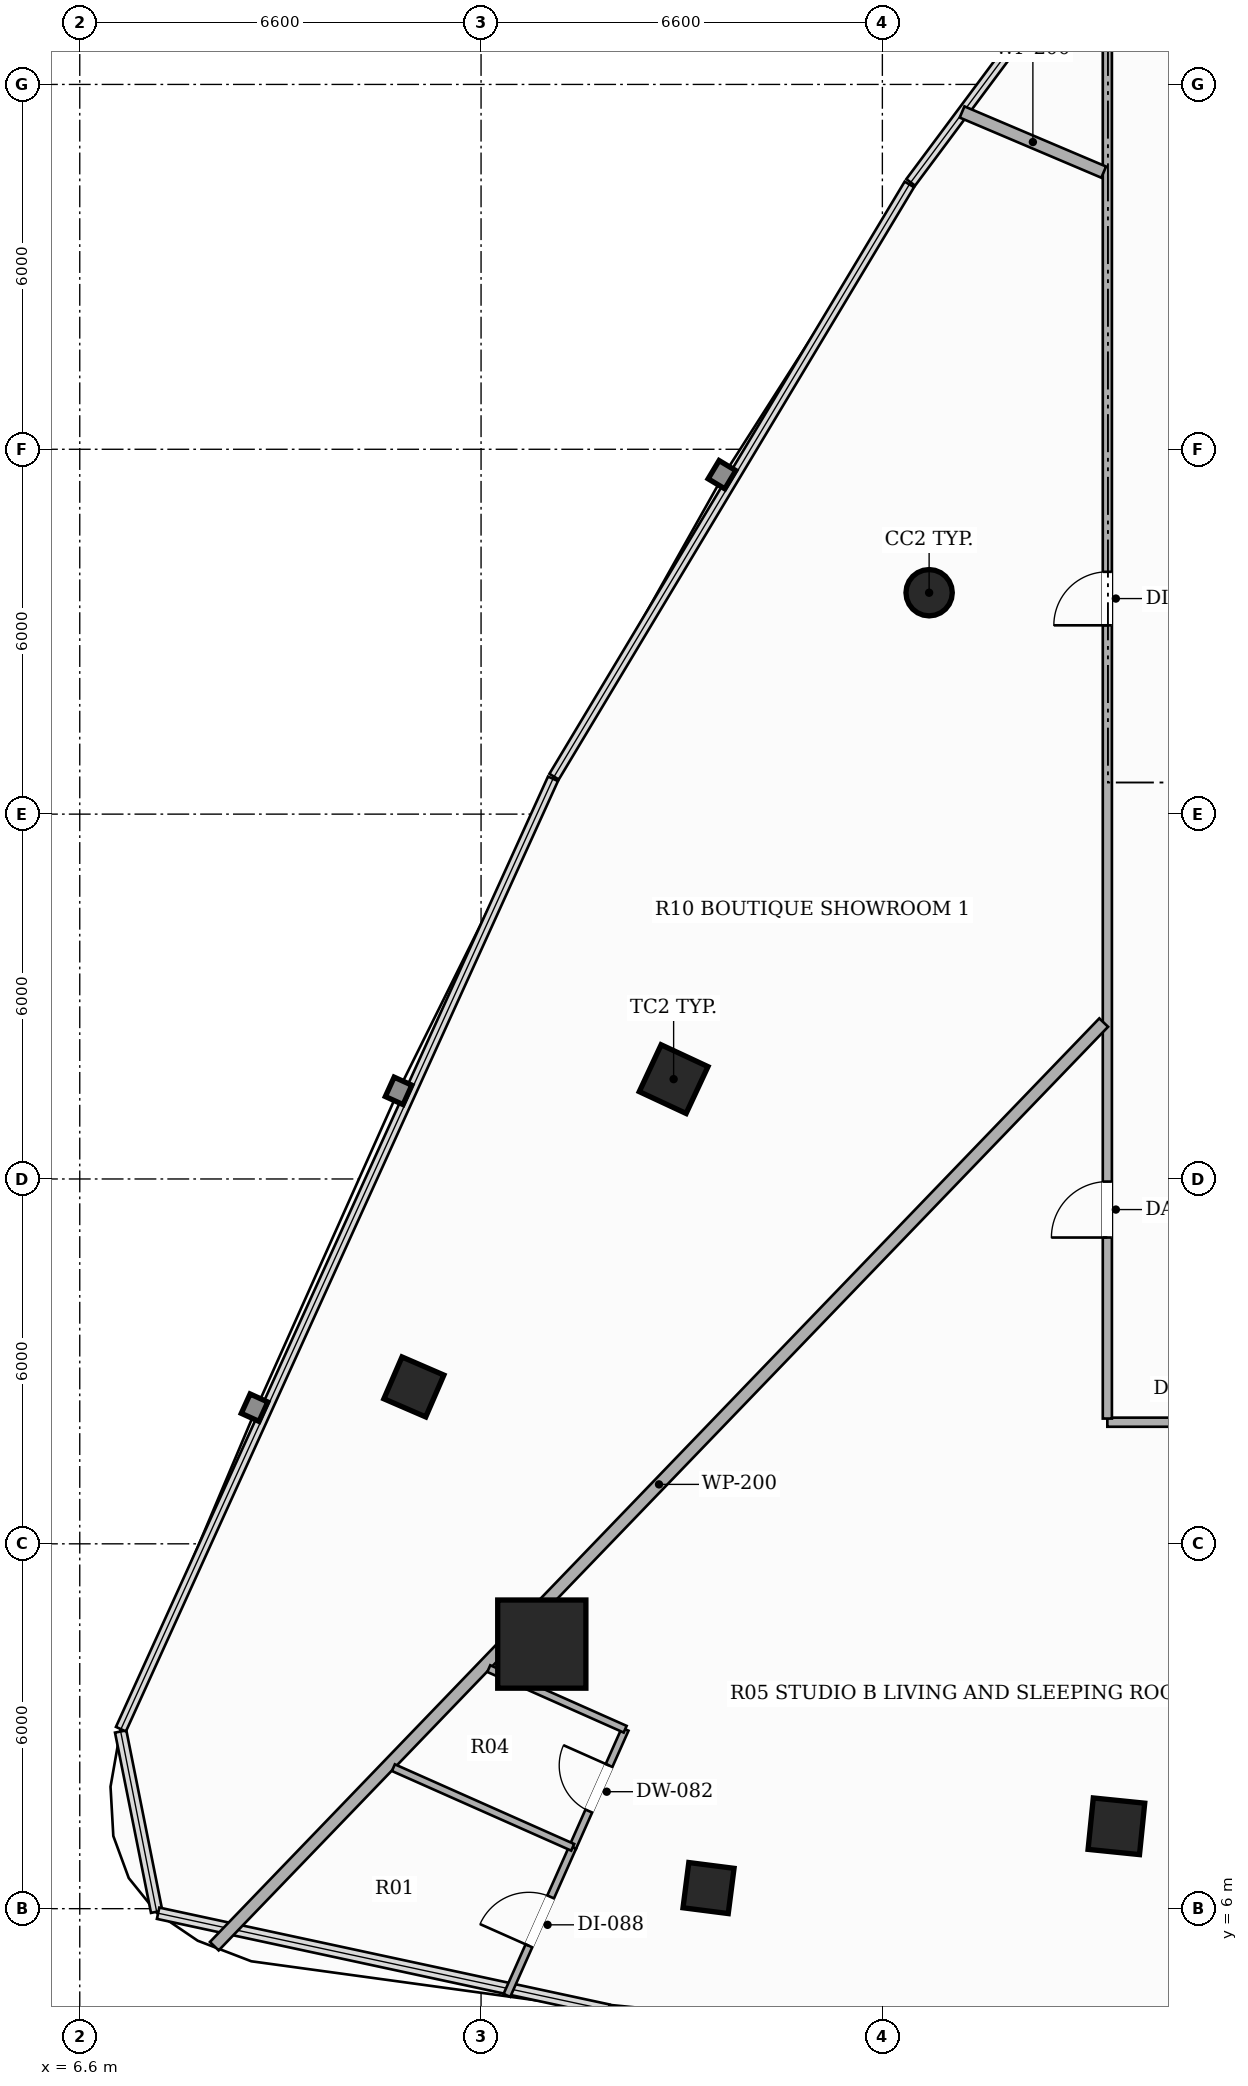
"""IFC4 building model, lengths in metres.
Left out: names, types, materials, properties, quantities, classifications, styles, units other than length and angle.
Written with IfcOpenShell. Run it as: python <this file> out.ifc"""

import sys

from ifc_helpers import new_model, si_unit, direction, frame, frame_2d, origin, origin_2d, place, context, subcontext, project, spatial, rectangle, hollow_rectangle, hollow_circle, extrude, element, fill, save


model = new_model("IFC4")
c1 = context("Model", 3, precision=1e-05, world=origin(), true_north=direction((0.0, 1.0)))
c2 = subcontext(c1, "Body", "Model", "MODEL_VIEW")
j1 = project(units=[si_unit("LENGTHUNIT", "METRE"), si_unit("PLANEANGLEUNIT", "RADIAN")], contexts=[c1])
p1 = place(None, origin())
s1 = spatial("IfcSite", under=j1, at=p1, CompositionType="ELEMENT")
p2 = place(p1, origin())
s2 = spatial("IfcBuilding", under=s1, at=p2, CompositionType="ELEMENT")
p3 = place(p2, frame((0.0, 0.0, 126.5)))
s3 = spatial("IfcBuildingStorey", under=s2, at=p3, CompositionType="ELEMENT", Elevation=126.5)
p4 = place(p3, frame((14.199, 10.351, 0.0), z_axis=(0.0, 0.0, 1.0), x_axis=(1.0, 0.0, 0.0)))
e1 = element("IfcColumn", 1, at=p4, inside=s3, PredefinedType="COLUMN", context=c2, shape_type="SweptSolid", body=[
    extrude(hollow_rectangle(XDim=1.45, YDim=1.45, WallThickness=0.045, at=origin_2d()), origin(), (0.0, 0.0, 1.0), 3.3),
])
p5 = place(p3, frame((20.569, 27.641, 0.0), z_axis=(0.0, 0.0, 1.0), x_axis=(1.0, 0.0, 0.0)))
e2 = element("IfcColumn", 2, at=p5, inside=s3, PredefinedType="COLUMN", context=c2, shape_type="SweptSolid", body=[
    extrude(hollow_circle(Radius=0.381, WallThickness=0.022, at=origin_2d()), origin(), (0.0, 0.0, 1.0), 3.3),
])
for number, where, z_axis, x_axis in (
    (3, (16.367, 19.642, 0.0), (0.0, 0.0, 1.0), (0.423, 0.906, 0.0)),
    (4, (23.649, 7.355, 0.0), (0.0, 0.0, 1.0), (-0.995, 0.101, 0.0)),
):
    element("IfcColumn", number, at=place(p3, frame(where, z_axis=z_axis, x_axis=x_axis)), inside=s3, PredefinedType="COLUMN", context=c2, shape_type="SweptSolid", body=[
        extrude(hollow_rectangle(XDim=0.85, YDim=0.85, WallThickness=0.028, at=origin_2d()), origin(), (0.0, 0.0, 1.0), 3.3),
    ])
for number, where, z_axis, x_axis in (
    (5, (12.095, 14.58, 0.0), (0.0, 0.0, 1.0), (0.397, 0.918, 0.0)),
    (6, (16.941, 6.339, 0.0), (0.0, 0.0, 1.0), (-0.992, 0.127, 0.0)),
):
    element("IfcColumn", number, at=place(p3, frame(where, z_axis=z_axis, x_axis=x_axis)), inside=s3, PredefinedType="COLUMN", context=c2, shape_type="SweptSolid", body=[
        extrude(hollow_rectangle(XDim=0.75, YDim=0.75, WallThickness=0.025, at=origin_2d()), origin(), (0.0, 0.0, 1.0), 3.3),
    ])
p6 = place(p3, frame((26.09, 14.0, 0.0), z_axis=(0.0, 0.0, 1.0), x_axis=(-1.0, 0.0, 0.0)))
e7 = element("IfcWall", 7, at=p6, inside=s3, PredefinedType="PARTITIONING", context=c2, shape_type="SweptSolid", body=[
    extrude(rectangle(XDim=2.59, YDim=0.15, at=frame_2d((1.295, 0.0))), origin(), (0.0, 0.0, 1.0), 2.721),
])
p7 = place(p3, frame((23.5, 14.06, 0.0), z_axis=(0.0, 0.0, 1.0), x_axis=(0.0, 1.0, 0.0)))
e8 = element("IfcWall", 8, at=p7, inside=s3, PredefinedType="PARTITIONING", context=c2, shape_type="SweptSolid", body=[
    extrude(rectangle(XDim=22.84, YDim=0.15, at=frame_2d((11.42, 0.0))), origin(), (0.0, 0.0, 1.0), 2.413),
])
p8 = place(p7, frame((13.045, 0.0, 0.0)))
e9 = element("IfcOpeningElement", 9, at=p8, cuts=e8, PredefinedType="OPENING", context=c2, shape_type="SweptSolid", body=[
    extrude(rectangle(XDim=0.88, YDim=2.1, at=frame_2d((0.44, 1.05))), frame((0.0, 0.085, 0.0), z_axis=(0.0, -1.0, 0.0), x_axis=(1.0, 0.0, 0.0)), (0.0, 0.0, 1.0), 0.17),
])
p9 = place(p7, frame((2.977, 0.0, 0.0)))
e10 = element("IfcOpeningElement", 10, at=p9, cuts=e8, PredefinedType="OPENING", context=c2, shape_type="SweptSolid", body=[
    extrude(rectangle(XDim=0.92, YDim=2.15, at=frame_2d((0.46, 1.075))), frame((0.0, 0.085, 0.0), z_axis=(0.0, -1.0, 0.0), x_axis=(1.0, 0.0, 0.0)), (0.0, 0.0, 1.0), 0.17),
])
p10 = place(p3, frame((23.44, 20.572, 0.0), z_axis=(0.0, 0.0, 1.0), x_axis=(-0.693655036552, -0.720307358193, 0.0)))
e11 = element("IfcWall", 11, at=p10, inside=s3, PredefinedType="PARTITIONING", context=c2, shape_type="SweptSolid", body=[
    extrude(rectangle(XDim=21.087, YDim=0.2, at=frame_2d((10.543, 0.0))), origin(), (0.0, 0.0, 1.0), 2.413),
])
p11 = place(p3, frame((21.111, 35.547, 0.0), z_axis=(0.0, 0.0, 1.0), x_axis=(0.920437694564, -0.390889307126, 0.0)))
e12 = element("IfcWall", 12, at=p11, inside=s3, PredefinedType="PARTITIONING", context=c2, shape_type="SweptSolid", body=[
    extrude(rectangle(XDim=2.53, YDim=0.2, at=frame_2d((1.265, 0.0))), origin(), (0.0, 0.0, 1.0), 3.06),
])
p12 = place(p3, frame((14.707, 7.009, 0.0), z_axis=(0.0, 0.0, 1.0), x_axis=(0.406127806348, 0.913816286193, 0.0)))
e13 = element("IfcWall", 13, at=p12, inside=s3, PredefinedType="PARTITIONING", context=c2, shape_type="SweptSolid", body=[
    extrude(rectangle(XDim=2.125, YDim=0.12, at=frame_2d((1.062, 0.0))), origin(), (0.0, 0.0, 1.0), 2.413),
])
p13 = place(p12, frame((0.653, 0.0, 0.0)))
e14 = element("IfcOpeningElement", 14, at=p13, cuts=e13, PredefinedType="OPENING", context=c2, shape_type="SweptSolid", body=[
    extrude(rectangle(XDim=0.82, YDim=2.1, at=frame_2d((0.41, 1.05))), frame((0.0, 0.07, 0.0), z_axis=(0.0, -1.0, 0.0), x_axis=(1.0, 0.0, 0.0)), (0.0, 0.0, 1.0), 0.14),
])
p14 = place(p3, frame((15.57, 8.951, 0.0), z_axis=(0.0, 0.0, 1.0), x_axis=(-0.91379514288, 0.406175376961, 0.0)))
e15 = element("IfcWall", 15, at=p14, inside=s3, PredefinedType="PARTITIONING", context=c2, shape_type="SweptSolid", body=[
    extrude(rectangle(XDim=2.455, YDim=0.12, at=frame_2d((1.228, 0.0))), origin(), (0.0, 0.0, 1.0), 2.413),
])
p15 = place(p3, frame((13.625, 4.574, 0.0), z_axis=(0.0, 0.0, 1.0), x_axis=(0.406070456553, 0.913841772034, 0.0)))
e16 = element("IfcWall", 16, at=p15, inside=s3, PredefinedType="PARTITIONING", context=c2, shape_type="SweptSolid", body=[
    extrude(rectangle(XDim=2.665, YDim=0.12, at=frame_2d((1.332, 0.0))), origin(), (0.0, 0.0, 1.0), 3.06),
])
p16 = place(p15, frame((0.892, 0.0, 0.0)))
e17 = element("IfcOpeningElement", 17, at=p16, cuts=e16, PredefinedType="OPENING", context=c2, shape_type="SweptSolid", body=[
    extrude(rectangle(XDim=0.88, YDim=2.1, at=frame_2d((0.44, 1.05))), frame((0.0, 0.07, 0.0), z_axis=(0.0, -1.0, 0.0), x_axis=(1.0, 0.0, 0.0)), (0.0, 0.0, 1.0), 0.14),
])
p17 = place(p3, frame((14.707, 7.009, 0.0), z_axis=(0.0, 0.0, 1.0), x_axis=(-0.913880174296, 0.40598402312, 0.0)))
e18 = element("IfcWall", 18, at=p17, inside=s3, PredefinedType="PARTITIONING", context=c2, shape_type="SweptSolid", body=[
    extrude(rectangle(XDim=3.227, YDim=0.12, at=frame_2d((1.613, 0.0))), origin(), (0.0, 0.0, 1.0), 3.06),
])
p18 = place(p8, origin())
e19 = element("IfcDoor", 19, at=p18, inside=s3, OperationType="SINGLE_SWING_LEFT", PredefinedType="DOOR", context=c2, shape_type="SweptSolid", body=[
    extrude(rectangle(XDim=0.88, YDim=2.1, at=frame_2d((0.44, 1.05))), frame((0.0, 0.025, 0.0), z_axis=(0.0, -1.0, 0.0), x_axis=(1.0, 0.0, 0.0)), (0.0, 0.0, 1.0), 0.05),
])
fill(e9, e19)
p19 = place(p9, origin())
e20 = element("IfcDoor", 20, at=p19, inside=s3, OperationType="SINGLE_SWING_LEFT", PredefinedType="DOOR", context=c2, shape_type="SweptSolid", body=[
    extrude(rectangle(XDim=0.92, YDim=2.15, at=frame_2d((0.46, 1.075))), frame((0.0, 0.025, 0.0), z_axis=(0.0, -1.0, 0.0), x_axis=(1.0, 0.0, 0.0)), (0.0, 0.0, 1.0), 0.05),
])
fill(e10, e20)
p20 = place(p13, origin())
e21 = element("IfcDoor", 21, at=p20, inside=s3, OperationType="SINGLE_SWING_RIGHT", PredefinedType="DOOR", context=c2, shape_type="SweptSolid", body=[
    extrude(rectangle(XDim=0.82, YDim=2.1, at=frame_2d((0.41, 1.05))), frame((0.0, 0.025, 0.0), z_axis=(0.0, -1.0, 0.0), x_axis=(1.0, 0.0, 0.0)), (0.0, 0.0, 1.0), 0.05),
])
fill(e14, e21)
p21 = place(p16, origin())
e22 = element("IfcDoor", 22, at=p21, inside=s3, OperationType="SINGLE_SWING_LEFT", PredefinedType="DOOR", context=c2, shape_type="SweptSolid", body=[
    extrude(rectangle(XDim=0.88, YDim=2.1, at=frame_2d((0.44, 1.05))), frame((0.0, 0.025, 0.0), z_axis=(0.0, -1.0, 0.0), x_axis=(1.0, 0.0, 0.0)), (0.0, 0.0, 1.0), 0.05),
])
fill(e17, e22)
save(model, sys.argv[1])
